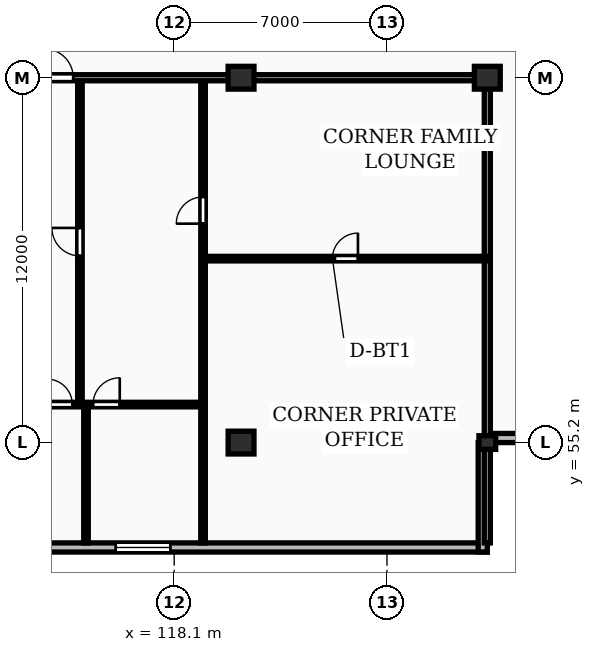
"""IFC4 building model, lengths in metres.
Left out: names, types, materials, properties, quantities, classifications, styles, units other than length and angle.
Written with IfcOpenShell. Run it as: python <this file> out.ifc"""

import sys

from ifc_helpers import new_model, si_unit, direction, frame, frame_2d, origin, origin_2d, place, context, subcontext, project, spatial, rectangle, extrude, element, fill, save


model = new_model("IFC4")
c1 = context("Model", 3, precision=1e-05, world=origin(), true_north=direction((0.0, 1.0)))
c2 = subcontext(c1, "Body", "Model", "MODEL_VIEW")
j1 = project(units=[si_unit("LENGTHUNIT", "METRE"), si_unit("PLANEANGLEUNIT", "RADIAN")], contexts=[c1])
p1 = place(None, origin())
s1 = spatial("IfcSite", under=j1, at=p1, CompositionType="ELEMENT")
p2 = place(p1, origin())
s2 = spatial("IfcBuilding", under=s1, at=p2, CompositionType="ELEMENT")
p3 = place(p2, frame((0.0, 0.0, 201.1)))
s3 = spatial("IfcBuildingStorey", under=s2, at=p3, CompositionType="ELEMENT", Elevation=201.1)
for number, where, z_axis, x_axis in (
    (1, (120.3, 55.2, 0.0), (0.0, 0.0, 1.0), (1.0, 0.0, 0.0)),
    (2, (120.3, 67.2, 0.0), (0.0, 0.0, 1.0), (1.0, 0.0, 0.0)),
):
    element("IfcColumn", number, at=place(p3, frame(where, z_axis=z_axis, x_axis=x_axis)), inside=s3, PredefinedType="COLUMN", context=c2, shape_type="SweptSolid", body=[
        extrude(rectangle(XDim=0.85, YDim=0.75, at=origin_2d()), origin(), (0.0, 0.0, 1.0), 3.25),
    ])
p4 = place(p3, frame((128.4, 55.2, 0.0), z_axis=(0.0, 0.0, 1.0), x_axis=(1.0, 0.0, 0.0)))
e3 = element("IfcColumn", 3, at=p4, inside=s3, PredefinedType="PILASTER", context=c2, shape_type="SweptSolid", body=[
    extrude(rectangle(XDim=0.55, YDim=0.45, at=origin_2d()), origin(), (0.0, 0.0, 1.0), 3.25),
])
p5 = place(p3, frame((128.4, 67.2, 0.0), z_axis=(0.0, 0.0, 1.0), x_axis=(1.0, 0.0, 0.0)))
e4 = element("IfcColumn", 4, at=p5, inside=s3, PredefinedType="COLUMN", context=c2, shape_type="SweptSolid", body=[
    extrude(rectangle(XDim=0.85, YDim=0.75, at=origin_2d()), origin(), (0.0, 0.0, 1.0), 3.25),
])
p6 = place(p3, frame((59.8, 51.75, 0.0), z_axis=(0.0, 0.0, 1.0), x_axis=(1.0, 0.0, 0.0)))
e5 = element("IfcWall", 5, at=p6, inside=s3, PredefinedType="STANDARD", context=c2, shape_type="SweptSolid", body=[
    extrude(rectangle(XDim=68.6, YDim=0.3, at=frame_2d((34.3, 0.0))), origin(), (0.0, 0.0, 1.0), 2.97),
])
p7 = place(p6, frame((13.025, 0.0, 0.85)))
e6 = element("IfcOpeningElement", 6, at=p7, cuts=e5, PredefinedType="OPENING", context=c2, shape_type="SweptSolid", body=[
    extrude(rectangle(XDim=1.8, YDim=1.8, at=frame_2d((0.9, 0.9))), frame((0.0, 0.16, 0.0), z_axis=(0.0, -1.0, 0.0), x_axis=(1.0, 0.0, 0.0)), (0.0, 0.0, 1.0), 0.32),
])
p8 = place(p6, frame((56.375, 0.0, 0.85)))
e7 = element("IfcOpeningElement", 7, at=p8, cuts=e5, PredefinedType="OPENING", context=c2, shape_type="SweptSolid", body=[
    extrude(rectangle(XDim=1.8, YDim=1.8, at=frame_2d((0.9, 0.9))), frame((0.0, 0.16, 0.0), z_axis=(0.0, -1.0, 0.0), x_axis=(1.0, 0.0, 0.0)), (0.0, 0.0, 1.0), 0.32),
])
p9 = place(p3, frame((128.25, 51.6, 0.0), z_axis=(0.0, 0.0, 1.0), x_axis=(0.0, 1.0, 0.0)))
e8 = element("IfcWall", 8, at=p9, inside=s3, PredefinedType="STANDARD", context=c2, shape_type="SweptSolid", body=[
    extrude(rectangle(XDim=3.6, YDim=0.3, at=frame_2d((1.8, 0.0))), origin(), (0.0, 0.0, 1.0), 2.97),
])
p10 = place(p3, frame((128.4, 55.35, 0.0), z_axis=(0.0, 0.0, 1.0), x_axis=(1.0, 0.0, 0.0)))
e9 = element("IfcWall", 9, at=p10, inside=s3, PredefinedType="STANDARD", context=c2, shape_type="SweptSolid", body=[
    extrude(rectangle(XDim=3.6, YDim=0.3, at=frame_2d((1.8, 0.0))), origin(), (0.0, 0.0, 1.0), 2.97),
])
p11 = place(p3, frame((128.4, 51.9, 0.0), z_axis=(0.0, 0.0, 1.0), x_axis=(0.0, 1.0, 0.0)))
e10 = element("IfcWall", 10, at=p11, inside=s3, PredefinedType="PARTITIONING", context=c2, shape_type="SweptSolid", body=[
    extrude(rectangle(XDim=15.3, YDim=0.2, at=frame_2d((7.65, 0.0))), origin(), (0.0, 0.0, 1.0), 2.277),
])
p12 = place(p3, frame((119.05, 61.25, 0.0), z_axis=(0.0, 0.0, 1.0), x_axis=(1.0, 0.0, 0.0)))
e11 = element("IfcWall", 11, at=p12, inside=s3, PredefinedType="PARTITIONING", context=c2, shape_type="SweptSolid", body=[
    extrude(rectangle(XDim=9.35, YDim=0.15, at=frame_2d((4.675, 0.0))), origin(), (0.0, 0.0, 1.0), 2.97),
])
p13 = place(p12, frame((4.255, 0.0, 0.0)))
e12 = element("IfcOpeningElement", 12, at=p13, cuts=e11, PredefinedType="OPENING", context=c2, shape_type="SweptSolid", body=[
    extrude(rectangle(XDim=0.84, YDim=2.04, at=frame_2d((0.42, 1.02))), frame((0.0, 0.085, 0.0), z_axis=(0.0, -1.0, 0.0), x_axis=(1.0, 0.0, 0.0)), (0.0, 0.0, 1.0), 0.17),
])
p14 = place(p3, frame((119.05, 51.9, 0.0), z_axis=(0.0, 0.0, 1.0), x_axis=(0.0, 1.0, 0.0)))
e13 = element("IfcWall", 13, at=p14, inside=s3, PredefinedType="PARTITIONING", context=c2, shape_type="SweptSolid", body=[
    extrude(rectangle(XDim=15.25, YDim=0.15, at=frame_2d((7.625, 0.0))), origin(), (0.0, 0.0, 1.0), 2.97),
])
p15 = place(p14, frame((10.5, 0.0, 0.0)))
e14 = element("IfcOpeningElement", 14, at=p15, cuts=e13, PredefinedType="OPENING", context=c2, shape_type="SweptSolid", body=[
    extrude(rectangle(XDim=0.88, YDim=2.06, at=frame_2d((0.44, 1.03))), frame((0.0, 0.085, 0.0), z_axis=(0.0, -1.0, 0.0), x_axis=(1.0, 0.0, 0.0)), (0.0, 0.0, 1.0), 0.17),
])
p16 = place(p3, frame((115.0, 56.45, 0.0), z_axis=(0.0, 0.0, 1.0), x_axis=(0.0, 1.0, 0.0)))
e15 = element("IfcWall", 15, at=p16, inside=s3, PredefinedType="PARTITIONING", context=c2, shape_type="SweptSolid", body=[
    extrude(rectangle(XDim=10.7, YDim=0.15, at=frame_2d((5.35, 0.0))), origin(), (0.0, 0.0, 1.0), 2.97),
])
p17 = place(p16, frame((4.89, 0.0, 0.0)))
e16 = element("IfcOpeningElement", 16, at=p17, cuts=e15, PredefinedType="OPENING", context=c2, shape_type="SweptSolid", body=[
    extrude(rectangle(XDim=0.92, YDim=2.08, at=frame_2d((0.46, 1.04))), frame((0.0, 0.085, 0.0), z_axis=(0.0, -1.0, 0.0), x_axis=(1.0, 0.0, 0.0)), (0.0, 0.0, 1.0), 0.17),
])
p18 = place(p3, frame((115.2, 51.9, 0.0), z_axis=(0.0, 0.0, 1.0), x_axis=(0.0, 1.0, 0.0)))
e17 = element("IfcWall", 17, at=p18, inside=s3, PredefinedType="PARTITIONING", context=c2, shape_type="SweptSolid", body=[
    extrude(rectangle(XDim=4.55, YDim=0.15, at=frame_2d((2.275, 0.0))), origin(), (0.0, 0.0, 1.0), 2.97),
])
p19 = place(p3, frame((112.27, 56.45, 0.0), z_axis=(0.0, 0.0, 1.0), x_axis=(1.0, 0.0, 0.0)))
e18 = element("IfcWall", 18, at=p19, inside=s3, PredefinedType="PARTITIONING", context=c2, shape_type="SweptSolid", body=[
    extrude(rectangle(XDim=6.76, YDim=0.15, at=frame_2d((3.38, 0.0))), origin(), (0.0, 0.0, 1.0), 2.97),
])
p20 = place(p19, frame((1.64, 0.0, 0.0)))
e19 = element("IfcOpeningElement", 19, at=p20, cuts=e18, PredefinedType="OPENING", context=c2, shape_type="SweptSolid", body=[
    extrude(rectangle(XDim=0.84, YDim=2.04, at=frame_2d((0.42, 1.02))), frame((0.0, 0.085, 0.0), z_axis=(0.0, -1.0, 0.0), x_axis=(1.0, 0.0, 0.0)), (0.0, 0.0, 1.0), 0.17),
])
p21 = place(p19, frame((3.16, 0.0, 0.0)))
e20 = element("IfcOpeningElement", 20, at=p21, cuts=e18, PredefinedType="OPENING", context=c2, shape_type="SweptSolid", body=[
    extrude(rectangle(XDim=0.88, YDim=2.06, at=frame_2d((0.44, 1.03))), frame((0.0, 0.085, 0.0), z_axis=(0.0, -1.0, 0.0), x_axis=(1.0, 0.0, 0.0)), (0.0, 0.0, 1.0), 0.17),
])
p22 = place(p3, frame((112.25, 67.2, 0.0), z_axis=(0.0, 0.0, 1.0), x_axis=(1.0, 0.0, 0.0)))
e21 = element("IfcWall", 21, at=p22, inside=s3, PredefinedType="PARTITIONING", context=c2, shape_type="SweptSolid", body=[
    extrude(rectangle(XDim=16.15, YDim=0.2, at=frame_2d((8.075, 0.0))), origin(), (0.0, 0.0, 1.0), 2.433),
])
p23 = place(p22, frame((1.58, 0.0, 0.0)))
e22 = element("IfcOpeningElement", 22, at=p23, cuts=e21, PredefinedType="OPENING", context=c2, shape_type="SweptSolid", body=[
    extrude(rectangle(XDim=0.95, YDim=2.15, at=frame_2d((0.475, 1.075))), frame((0.0, 0.11, 0.0), z_axis=(0.0, -1.0, 0.0), x_axis=(1.0, 0.0, 0.0)), (0.0, 0.0, 1.0), 0.22),
])
p24 = place(p8, origin())
e23 = element("IfcWindow", 23, at=p24, inside=s3, PartitioningType="SINGLE_PANEL", PredefinedType="WINDOW", context=c2, shape_type="SweptSolid", body=[
    extrude(rectangle(XDim=1.8, YDim=1.8, at=frame_2d((0.9, 0.9))), frame((0.0, 0.03, 0.0), z_axis=(0.0, -1.0, 0.0), x_axis=(1.0, 0.0, 0.0)), (0.0, 0.0, 1.0), 0.06),
])
fill(e7, e23)
p25 = place(p13, origin())
e24 = element("IfcDoor", 24, at=p25, inside=s3, OperationType="SINGLE_SWING_RIGHT", PredefinedType="DOOR", context=c2, shape_type="SweptSolid", body=[
    extrude(rectangle(XDim=0.84, YDim=2.04, at=frame_2d((0.42, 1.02))), frame((0.0, 0.025, 0.0), z_axis=(0.0, -1.0, 0.0), x_axis=(1.0, 0.0, 0.0)), (0.0, 0.0, 1.0), 0.05),
])
fill(e12, e24)
p26 = place(p15, origin())
e25 = element("IfcDoor", 25, at=p26, inside=s3, OperationType="SINGLE_SWING_LEFT", PredefinedType="DOOR", context=c2, shape_type="SweptSolid", body=[
    extrude(rectangle(XDim=0.88, YDim=2.06, at=frame_2d((0.44, 1.03))), frame((0.0, 0.025, 0.0), z_axis=(0.0, -1.0, 0.0), x_axis=(1.0, 0.0, 0.0)), (0.0, 0.0, 1.0), 0.05),
])
fill(e14, e25)
p27 = place(p17, origin())
e26 = element("IfcDoor", 26, at=p27, inside=s3, OperationType="SINGLE_SWING_RIGHT", PredefinedType="DOOR", context=c2, shape_type="SweptSolid", body=[
    extrude(rectangle(XDim=0.92, YDim=2.08, at=frame_2d((0.46, 1.04))), frame((0.0, 0.025, 0.0), z_axis=(0.0, -1.0, 0.0), x_axis=(1.0, 0.0, 0.0)), (0.0, 0.0, 1.0), 0.05),
])
fill(e16, e26)
p28 = place(p20, origin())
e27 = element("IfcDoor", 27, at=p28, inside=s3, OperationType="SINGLE_SWING_LEFT", PredefinedType="DOOR", context=c2, shape_type="SweptSolid", body=[
    extrude(rectangle(XDim=0.84, YDim=2.04, at=frame_2d((0.42, 1.02))), frame((0.0, 0.025, 0.0), z_axis=(0.0, -1.0, 0.0), x_axis=(1.0, 0.0, 0.0)), (0.0, 0.0, 1.0), 0.05),
])
fill(e19, e27)
p29 = place(p21, origin())
e28 = element("IfcDoor", 28, at=p29, inside=s3, OperationType="SINGLE_SWING_RIGHT", PredefinedType="DOOR", context=c2, shape_type="SweptSolid", body=[
    extrude(rectangle(XDim=0.88, YDim=2.06, at=frame_2d((0.44, 1.03))), frame((0.0, 0.025, 0.0), z_axis=(0.0, -1.0, 0.0), x_axis=(1.0, 0.0, 0.0)), (0.0, 0.0, 1.0), 0.05),
])
fill(e20, e28)
p30 = place(p23, origin())
e29 = element("IfcDoor", 29, at=p30, inside=s3, OperationType="SINGLE_SWING_LEFT", PredefinedType="DOOR", context=c2, shape_type="SweptSolid", body=[
    extrude(rectangle(XDim=0.95, YDim=2.15, at=frame_2d((0.475, 1.075))), frame((0.0, 0.025, 0.0), z_axis=(0.0, -1.0, 0.0), x_axis=(1.0, 0.0, 0.0)), (0.0, 0.0, 1.0), 0.05),
])
fill(e22, e29)
save(model, sys.argv[1])
